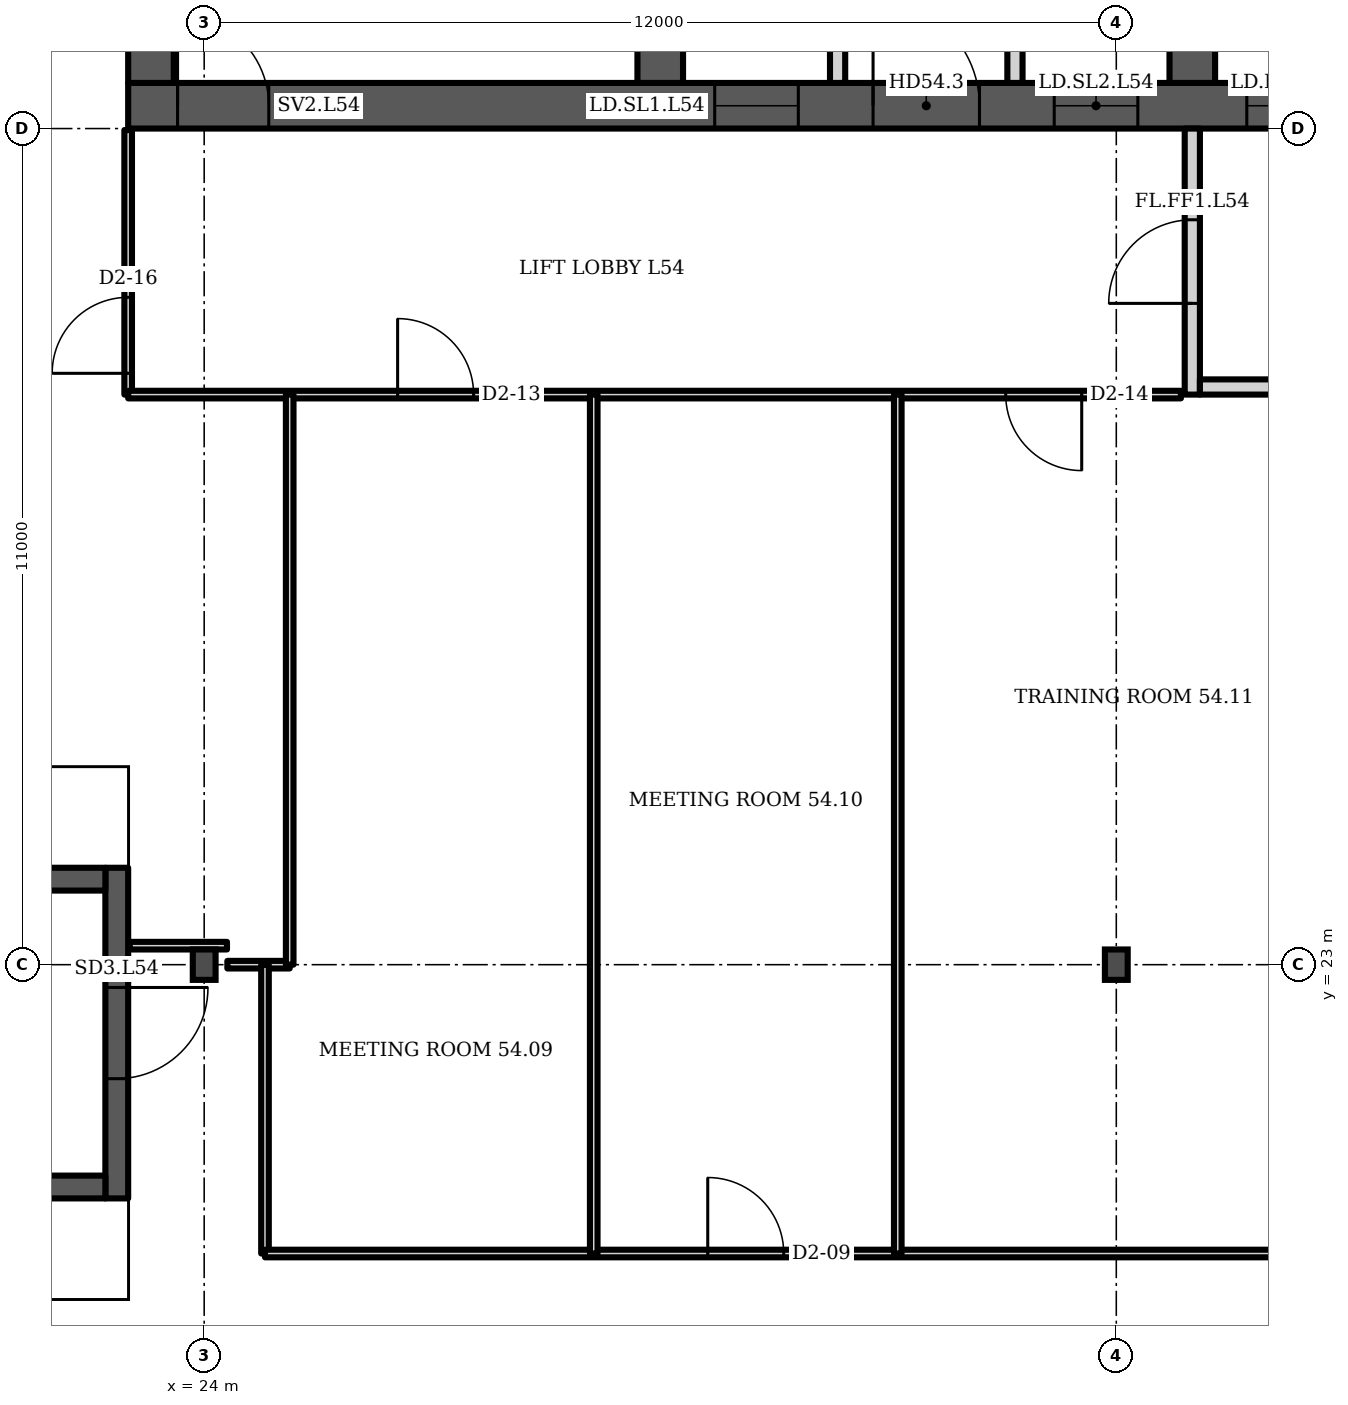
"""IFC4 building model, lengths in metres.
Left out: names, types, materials, properties, quantities, classifications, styles, units other than length and angle.
Written with IfcOpenShell. Run it as: python <this file> out.ifc"""

import sys

from ifc_helpers import new_model, si_unit, direction, frame, frame_2d, origin, origin_2d, place, context, subcontext, project, spatial, polyline, rectangle, i_section, outline, extrude, element, fill, save


model = new_model("IFC4")
c1 = context("Model", 3, precision=1e-05, world=origin(), true_north=direction((0.0, 1.0)))
c2 = subcontext(c1, "Body", "Model", "MODEL_VIEW")
j1 = project(units=[si_unit("LENGTHUNIT", "METRE"), si_unit("PLANEANGLEUNIT", "RADIAN")], contexts=[c1])
p1 = place(None, origin())
s1 = spatial("IfcSite", under=j1, at=p1, CompositionType="ELEMENT")
p2 = place(p1, origin())
s2 = spatial("IfcBuilding", under=s1, at=p2, CompositionType="ELEMENT")
p3 = place(p2, frame((0.0, 0.0, 217.9)))
s3 = spatial("IfcBuildingStorey", under=s2, at=p3, CompositionType="ELEMENT", Elevation=217.9)
p4 = place(p3, frame((23.0, 34.3, 0.0), z_axis=(0.0, 0.0, 1.0), x_axis=(1.0, 0.0, 0.0)))
e1 = element("IfcWall", 1, at=p4, inside=s3, PredefinedType="SHEAR", context=c2, shape_type="SweptSolid", body=[
    extrude(rectangle(XDim=35.0, YDim=0.6, at=frame_2d((17.5, 0.0))), origin(), (0.0, 0.0, 1.0), 3.6),
])
p5 = place(p4, frame((0.65, 0.0, 0.0)))
e2 = element("IfcOpeningElement", 2, at=p5, cuts=e1, PredefinedType="OPENING", context=c2, shape_type="SweptSolid", body=[
    extrude(rectangle(XDim=1.2, YDim=2.1, at=frame_2d((0.6, 1.05))), frame((0.0, 0.31, 0.0), z_axis=(0.0, -1.0, 0.0), x_axis=(1.0, 0.0, 0.0)), (0.0, 0.0, 1.0), 0.62),
])
p6 = place(p4, frame((7.717, 0.0, 0.0)))
e3 = element("IfcOpeningElement", 3, at=p6, cuts=e1, PredefinedType="OPENING", context=c2, shape_type="SweptSolid", body=[
    extrude(rectangle(XDim=1.1, YDim=2.1, at=frame_2d((0.55, 1.05))), frame((0.0, 0.31, 0.0), z_axis=(0.0, -1.0, 0.0), x_axis=(1.0, 0.0, 0.0)), (0.0, 0.0, 1.0), 0.62),
])
p7 = place(p4, frame((12.183, 0.0, 0.0)))
e4 = element("IfcOpeningElement", 4, at=p7, cuts=e1, PredefinedType="OPENING", context=c2, shape_type="SweptSolid", body=[
    extrude(rectangle(XDim=1.1, YDim=2.1, at=frame_2d((0.55, 1.05))), frame((0.0, 0.31, 0.0), z_axis=(0.0, -1.0, 0.0), x_axis=(1.0, 0.0, 0.0)), (0.0, 0.0, 1.0), 0.62),
])
p8 = place(p4, frame((9.8, 0.0, 0.0)))
e5 = element("IfcOpeningElement", 5, at=p8, cuts=e1, PredefinedType="OPENING", context=c2, shape_type="SweptSolid", body=[
    extrude(rectangle(XDim=1.4, YDim=2.1, at=frame_2d((0.7, 1.05))), frame((0.0, 0.31, 0.0), z_axis=(0.0, -1.0, 0.0), x_axis=(1.0, 0.0, 0.0)), (0.0, 0.0, 1.0), 0.62),
])
p9 = place(p4, frame((14.717, 0.0, 0.0)))
e6 = element("IfcOpeningElement", 6, at=p9, cuts=e1, PredefinedType="OPENING", context=c2, shape_type="SweptSolid", body=[
    extrude(rectangle(XDim=1.1, YDim=2.1, at=frame_2d((0.55, 1.05))), frame((0.0, 0.31, 0.0), z_axis=(0.0, -1.0, 0.0), x_axis=(1.0, 0.0, 0.0)), (0.0, 0.0, 1.0), 0.62),
])
p10 = place(p4, frame((16.95, 0.0, 0.0)))
e7 = element("IfcOpeningElement", 7, at=p10, cuts=e1, PredefinedType="OPENING", context=c2, shape_type="SweptSolid", body=[
    extrude(rectangle(XDim=1.1, YDim=2.1, at=frame_2d((0.55, 1.05))), frame((0.0, 0.31, 0.0), z_axis=(0.0, -1.0, 0.0), x_axis=(1.0, 0.0, 0.0)), (0.0, 0.0, 1.0), 0.62),
])
p11 = place(p4, frame((19.183, 0.0, 0.0)))
e8 = element("IfcOpeningElement", 8, at=p11, cuts=e1, PredefinedType="OPENING", context=c2, shape_type="SweptSolid", body=[
    extrude(rectangle(XDim=1.1, YDim=2.1, at=frame_2d((0.55, 1.05))), frame((0.0, 0.31, 0.0), z_axis=(0.0, -1.0, 0.0), x_axis=(1.0, 0.0, 0.0)), (0.0, 0.0, 1.0), 0.62),
])
p12 = place(p4, frame((26.15, 0.0, 0.0)))
e9 = element("IfcOpeningElement", 9, at=p12, cuts=e1, PredefinedType="OPENING", context=c2, shape_type="SweptSolid", body=[
    extrude(rectangle(XDim=1.2, YDim=2.1, at=frame_2d((0.6, 1.05))), frame((0.0, 0.31, 0.0), z_axis=(0.0, -1.0, 0.0), x_axis=(1.0, 0.0, 0.0)), (0.0, 0.0, 1.0), 0.62),
])
p13 = place(p4, frame((28.767, 0.0, 0.0)))
e10 = element("IfcOpeningElement", 10, at=p13, cuts=e1, PredefinedType="OPENING", context=c2, shape_type="SweptSolid", body=[
    extrude(rectangle(XDim=1.0, YDim=2.1, at=frame_2d((0.5, 1.05))), frame((0.0, 0.31, 0.0), z_axis=(0.0, -1.0, 0.0), x_axis=(1.0, 0.0, 0.0)), (0.0, 0.0, 1.0), 0.62),
])
p14 = place(p4, frame((33.083, 0.0, 0.0)))
e11 = element("IfcOpeningElement", 11, at=p14, cuts=e1, PredefinedType="OPENING", context=c2, shape_type="SweptSolid", body=[
    extrude(rectangle(XDim=1.0, YDim=2.1, at=frame_2d((0.5, 1.05))), frame((0.0, 0.31, 0.0), z_axis=(0.0, -1.0, 0.0), x_axis=(1.0, 0.0, 0.0)), (0.0, 0.0, 1.0), 0.62),
])
p15 = place(p4, frame((30.8, 0.0, 0.0)))
e12 = element("IfcOpeningElement", 12, at=p15, cuts=e1, PredefinedType="OPENING", context=c2, shape_type="SweptSolid", body=[
    extrude(rectangle(XDim=1.4, YDim=2.1, at=frame_2d((0.7, 1.05))), frame((0.0, 0.31, 0.0), z_axis=(0.0, -1.0, 0.0), x_axis=(1.0, 0.0, 0.0)), (0.0, 0.0, 1.0), 0.62),
])
p16 = place(p3, frame((23.3, 34.6, 0.0), z_axis=(0.0, 0.0, 1.0), x_axis=(0.0, 1.0, 0.0)))
e13 = element("IfcWall", 13, at=p16, inside=s3, PredefinedType="SHEAR", context=c2, shape_type="SweptSolid", body=[
    extrude(rectangle(XDim=13.585, YDim=0.6, at=frame_2d((6.792, 0.0))), origin(), (0.0, 0.0, 1.0), 3.6),
])
p17 = place(p3, frame((30.0, 34.6, 0.0), z_axis=(0.0, 0.0, 1.0), x_axis=(0.0, 1.0, 0.0)))
e14 = element("IfcWall", 14, at=p17, inside=s3, PredefinedType="SHEAR", context=c2, shape_type="SweptSolid", body=[
    extrude(rectangle(XDim=14.171, YDim=0.6, at=frame_2d((7.085, 0.0))), origin(), (0.0, 0.0, 1.0), 3.6),
])
p18 = place(p17, frame((3.8, 0.0, 0.0)))
e15 = element("IfcOpeningElement", 15, at=p18, cuts=e14, PredefinedType="OPENING", context=c2, shape_type="SweptSolid", body=[
    extrude(rectangle(XDim=1.1, YDim=2.1, at=frame_2d((0.55, 1.05))), frame((0.0, 0.31, 0.0), z_axis=(0.0, -1.0, 0.0), x_axis=(1.0, 0.0, 0.0)), (0.0, 0.0, 1.0), 0.62),
])
p19 = place(p3, frame((37.0, 34.6, 0.0), z_axis=(0.0, 0.0, 1.0), x_axis=(0.0, 1.0, 0.0)))
e16 = element("IfcWall", 16, at=p19, inside=s3, PredefinedType="SHEAR", context=c2, shape_type="SweptSolid", body=[
    extrude(rectangle(XDim=14.784, YDim=0.6, at=frame_2d((7.392, 0.0))), origin(), (0.0, 0.0, 1.0), 3.6),
])
p20 = place(p19, frame((11.302, 0.0, 0.0)))
e17 = element("IfcOpeningElement", 17, at=p20, cuts=e16, PredefinedType="OPENING", context=c2, shape_type="SweptSolid", body=[
    extrude(rectangle(XDim=1.0, YDim=2.1, at=frame_2d((0.5, 1.05))), frame((0.0, 0.31, 0.0), z_axis=(0.0, -1.0, 0.0), x_axis=(1.0, 0.0, 0.0)), (0.0, 0.0, 1.0), 0.62),
])
p21 = place(p19, frame((3.8, 0.0, 0.0)))
e18 = element("IfcOpeningElement", 18, at=p21, cuts=e16, PredefinedType="OPENING", context=c2, shape_type="SweptSolid", body=[
    extrude(rectangle(XDim=1.1, YDim=2.1, at=frame_2d((0.55, 1.05))), frame((0.0, 0.31, 0.0), z_axis=(0.0, -1.0, 0.0), x_axis=(1.0, 0.0, 0.0)), (0.0, 0.0, 1.0), 0.62),
])
for number, where, z_axis, x_axis in (
    (19, (24.0, 23.0, 0.0), (0.0, 0.0, 1.0), (1.0, 0.0, 0.0)),
    (20, (36.0, 23.0, 0.0), (0.0, 0.0, 1.0), (1.0, 0.0, 0.0)),
):
    element("IfcColumn", number, at=place(p3, frame(where, z_axis=z_axis, x_axis=x_axis)), inside=s3, PredefinedType="COLUMN", context=c2, shape_type="SweptSolid", body=[
        extrude(i_section(OverallWidth=0.3, OverallDepth=0.4, WebThickness=0.013, FlangeThickness=0.024, FilletRadius=0.027, at=origin_2d()), origin(), (0.0, 0.0, 1.0), 3.6),
    ])
p22 = place(p3, origin())
e21 = element("IfcWall", 21, at=p22, inside=s3, PredefinedType="PARTITIONING", context=c2, shape_type="SweptSolid", body=[
    extrude(outline(polyline([(32.233, 37.45), (30.3, 37.45), (30.3, 37.65), (32.233, 37.65), (32.433, 37.65), (32.433, 34.6), (32.233, 34.6), (32.233, 37.45)])), origin(), (0.0, 0.0, 1.0), 3.2),
])
p23 = place(p3, origin())
e22 = element("IfcWall", 22, at=p23, inside=s3, PredefinedType="PARTITIONING", context=c2, shape_type="SweptSolid", body=[
    extrude(outline(polyline([(34.567, 37.65), (34.767, 37.65), (36.7, 37.65), (36.7, 37.45), (34.767, 37.45), (34.767, 34.6), (34.567, 34.6), (34.567, 37.65)])), origin(), (0.0, 0.0, 1.0), 3.2),
])
p24 = place(p3, origin())
e23 = element("IfcWall", 23, at=p24, inside=s3, PredefinedType="PARTITIONING", context=c2, shape_type="SweptSolid", body=[
    extrude(outline(polyline([(41.567, 37.1), (39.433, 37.1), (39.433, 34.6), (39.233, 34.6), (39.233, 37.45), (37.3, 37.45), (37.3, 37.65), (39.233, 37.65), (39.433, 37.65), (39.433, 37.3), (41.567, 37.3), (41.567, 37.35), (41.767, 37.35), (43.7, 37.35), (43.7, 37.15), (41.767, 37.15), (41.767, 34.6), (41.567, 34.6), (41.567, 37.1)])), origin(), (0.0, 0.0, 1.0), 3.2),
])
p25 = place(p3, frame((37.0, 30.5, 0.0), z_axis=(0.0, 0.0, 1.0), x_axis=(0.0, 1.0, 0.0)))
e24 = element("IfcWall", 24, at=p25, inside=s3, PredefinedType="PARTITIONING", context=c2, shape_type="SweptSolid", body=[
    extrude(rectangle(XDim=3.5, YDim=0.2, at=frame_2d((1.75, 0.0))), origin(), (0.0, 0.0, 1.0), 3.2),
])
p26 = place(p25, frame((1.2, 0.0, 0.0)))
e25 = element("IfcOpeningElement", 25, at=p26, cuts=e24, PredefinedType="OPENING", context=c2, shape_type="SweptSolid", body=[
    extrude(rectangle(XDim=1.1, YDim=2.1, at=frame_2d((0.55, 1.05))), frame((0.0, 0.11, 0.0), z_axis=(0.0, -1.0, 0.0), x_axis=(1.0, 0.0, 0.0)), (0.0, 0.0, 1.0), 0.22),
])
p27 = place(p3, frame((37.1, 30.6, 0.0), z_axis=(0.0, 0.0, 1.0), x_axis=(1.0, 0.0, 0.0)))
e26 = element("IfcWall", 26, at=p27, inside=s3, PredefinedType="PARTITIONING", context=c2, shape_type="SweptSolid", body=[
    extrude(rectangle(XDim=2.8, YDim=0.2, at=frame_2d((1.4, 0.0))), origin(), (0.0, 0.0, 1.0), 3.2),
])
p28 = place(p3, frame((22.85, 19.925, 0.0), z_axis=(0.0, 0.0, 1.0), x_axis=(0.0, 1.0, 0.0)))
e27 = element("IfcWall", 27, at=p28, inside=s3, PredefinedType="SHEAR", context=c2, shape_type="SweptSolid", body=[
    extrude(rectangle(XDim=4.35, YDim=0.3, at=frame_2d((2.175, 0.0))), origin(), (0.0, 0.0, 1.0), 3.2),
])
p29 = place(p28, frame((1.575, 0.0, 0.0)))
e28 = element("IfcOpeningElement", 28, at=p29, cuts=e27, PredefinedType="OPENING", context=c2, shape_type="SweptSolid", body=[
    extrude(rectangle(XDim=1.2, YDim=2.1, at=frame_2d((0.6, 1.05))), frame((0.0, 0.16, 0.0), z_axis=(0.0, -1.0, 0.0), x_axis=(1.0, 0.0, 0.0)), (0.0, 0.0, 1.0), 0.32),
])
p30 = place(p3, frame((23.0, 30.5, 0.0), z_axis=(0.0, 0.0, 1.0), x_axis=(0.0, 1.0, 0.0)))
e29 = element("IfcWall", 29, at=p30, inside=s3, PredefinedType="PARTITIONING", context=c2, shape_type="SweptSolid", body=[
    extrude(rectangle(XDim=3.48, YDim=0.1, at=frame_2d((1.74, 0.0))), origin(), (0.0, 0.0, 1.0), 3.2),
])
p31 = place(p30, frame((0.28, 0.0, 0.0)))
e30 = element("IfcOpeningElement", 30, at=p31, cuts=e29, PredefinedType="OPENING", context=c2, shape_type="SweptSolid", body=[
    extrude(rectangle(XDim=1.0, YDim=2.1, at=frame_2d((0.5, 1.05))), frame((0.0, 0.06, 0.0), z_axis=(0.0, -1.0, 0.0), x_axis=(1.0, 0.0, 0.0)), (0.0, 0.0, 1.0), 0.12),
])
p32 = place(p3, frame((23.0, 30.5, 0.0), z_axis=(0.0, 0.0, 1.0), x_axis=(1.0, 0.0, 0.0)))
e31 = element("IfcWall", 31, at=p32, inside=s3, PredefinedType="PARTITIONING", context=c2, shape_type="SweptSolid", body=[
    extrude(rectangle(XDim=13.85, YDim=0.1, at=frame_2d((6.925, 0.0))), origin(), (0.0, 0.0, 1.0), 3.2),
])
p33 = place(p32, frame((3.545, 0.0, 0.0)))
e32 = element("IfcOpeningElement", 32, at=p33, cuts=e31, PredefinedType="OPENING", context=c2, shape_type="SweptSolid", body=[
    extrude(rectangle(XDim=1.0, YDim=2.1, at=frame_2d((0.5, 1.05))), frame((0.0, 0.06, 0.0), z_axis=(0.0, -1.0, 0.0), x_axis=(1.0, 0.0, 0.0)), (0.0, 0.0, 1.0), 0.12),
])
p34 = place(p32, frame((11.545, 0.0, 0.0)))
e33 = element("IfcOpeningElement", 33, at=p34, cuts=e31, PredefinedType="OPENING", context=c2, shape_type="SweptSolid", body=[
    extrude(rectangle(XDim=1.0, YDim=2.1, at=frame_2d((0.5, 1.05))), frame((0.0, 0.06, 0.0), z_axis=(0.0, -1.0, 0.0), x_axis=(1.0, 0.0, 0.0)), (0.0, 0.0, 1.0), 0.12),
])
p35 = place(p3, frame((23.02, 23.25, 0.0), z_axis=(0.0, 0.0, 1.0), x_axis=(1.0, 0.0, 0.0)))
e34 = element("IfcWall", 34, at=p35, inside=s3, PredefinedType="PARTITIONING", context=c2, shape_type="SweptSolid", body=[
    extrude(rectangle(XDim=1.28, YDim=0.1, at=frame_2d((0.64, 0.0))), origin(), (0.0, 0.0, 1.0), 3.2),
])
p36 = place(p3, frame((24.305, 23.0, 0.0), z_axis=(0.0, 0.0, 1.0), x_axis=(1.0, 0.0, 0.0)))
e35 = element("IfcWall", 35, at=p36, inside=s3, PredefinedType="PARTITIONING", context=c2, shape_type="SweptSolid", body=[
    extrude(rectangle(XDim=0.82, YDim=0.1, at=frame_2d((0.41, 0.0))), origin(), (0.0, 0.0, 1.0), 3.2),
])
p37 = place(p3, frame((24.8, 19.2, 0.0), z_axis=(0.0, 0.0, 1.0), x_axis=(0.0, 1.0, 0.0)))
e36 = element("IfcWall", 36, at=p37, inside=s3, PredefinedType="PARTITIONING", context=c2, shape_type="SweptSolid", body=[
    extrude(rectangle(XDim=3.8, YDim=0.1, at=frame_2d((1.9, 0.0))), origin(), (0.0, 0.0, 1.0), 3.2),
])
p38 = place(p3, frame((24.8, 19.2, 0.0), z_axis=(0.0, 0.0, 1.0), x_axis=(1.0, 0.0, 0.0)))
e37 = element("IfcWall", 37, at=p38, inside=s3, PredefinedType="PARTITIONING", context=c2, shape_type="SweptSolid", body=[
    extrude(rectangle(XDim=20.76, YDim=0.1, at=frame_2d((10.38, 0.0))), origin(), (0.0, 0.0, 1.0), 3.2),
])
p39 = place(p38, frame((5.825, 0.0, 0.0)))
e38 = element("IfcOpeningElement", 38, at=p39, cuts=e37, PredefinedType="OPENING", context=c2, shape_type="SweptSolid", body=[
    extrude(rectangle(XDim=1.0, YDim=2.1, at=frame_2d((0.5, 1.05))), frame((0.0, 0.06, 0.0), z_axis=(0.0, -1.0, 0.0), x_axis=(1.0, 0.0, 0.0)), (0.0, 0.0, 1.0), 0.12),
])
p40 = place(p3, frame((25.125, 23.0, 0.0), z_axis=(0.0, 0.0, 1.0), x_axis=(0.0, 1.0, 0.0)))
e39 = element("IfcWall", 39, at=p40, inside=s3, PredefinedType="PARTITIONING", context=c2, shape_type="SweptSolid", body=[
    extrude(rectangle(XDim=7.5, YDim=0.1, at=frame_2d((3.75, 0.0))), origin(), (0.0, 0.0, 1.0), 3.2),
])
for number, where, z_axis, x_axis in (
    (40, (29.125, 19.2, 0.0), (0.0, 0.0, 1.0), (0.0, 1.0, 0.0)),
    (41, (33.125, 19.2, 0.0), (0.0, 0.0, 1.0), (0.0, 1.0, 0.0)),
):
    element("IfcWall", number, at=place(p3, frame(where, z_axis=z_axis, x_axis=x_axis)), inside=s3, PredefinedType="PARTITIONING", context=c2, shape_type="SweptSolid", body=[
        extrude(rectangle(XDim=11.3, YDim=0.1, at=frame_2d((5.65, 0.0))), origin(), (0.0, 0.0, 1.0), 3.2),
    ])
for number, where, z_axis, x_axis in (
    (42, (15.2, 20.075, 0.0), (0.0, 0.0, 1.0), (1.0, 0.0, 0.0)),
    (43, (15.2, 24.125, 0.0), (0.0, 0.0, 1.0), (1.0, 0.0, 0.0)),
):
    element("IfcWall", number, at=place(p3, frame(where, z_axis=z_axis, x_axis=x_axis)), inside=s3, PredefinedType="SHEAR", context=c2, shape_type="SweptSolid", body=[
        extrude(rectangle(XDim=7.5, YDim=0.3, at=frame_2d((3.75, 0.0))), origin(), (0.0, 0.0, 1.0), 3.2),
    ])
p41 = place(p5, origin())
e44 = element("IfcDoor", 44, at=p41, inside=s3, OperationType="SINGLE_SWING_LEFT", PredefinedType="DOOR", context=c2, shape_type="SweptSolid", body=[
    extrude(rectangle(XDim=1.2, YDim=2.1, at=frame_2d((0.6, 1.05))), frame((0.0, 0.025, 0.0), z_axis=(0.0, -1.0, 0.0), x_axis=(1.0, 0.0, 0.0)), (0.0, 0.0, 1.0), 0.05),
])
fill(e2, e44)
p42 = place(p6, origin())
e45 = element("IfcDoor", 45, at=p42, inside=s3, OperationType="DOUBLE_DOOR_SLIDING", PredefinedType="DOOR", context=c2, shape_type="SweptSolid", body=[
    extrude(rectangle(XDim=1.1, YDim=2.1, at=frame_2d((0.55, 1.05))), frame((0.0, 0.025, 0.0), z_axis=(0.0, -1.0, 0.0), x_axis=(1.0, 0.0, 0.0)), (0.0, 0.0, 1.0), 0.05),
])
fill(e3, e45)
p43 = place(p7, origin())
e46 = element("IfcDoor", 46, at=p43, inside=s3, OperationType="DOUBLE_DOOR_SLIDING", PredefinedType="DOOR", context=c2, shape_type="SweptSolid", body=[
    extrude(rectangle(XDim=1.1, YDim=2.1, at=frame_2d((0.55, 1.05))), frame((0.0, 0.025, 0.0), z_axis=(0.0, -1.0, 0.0), x_axis=(1.0, 0.0, 0.0)), (0.0, 0.0, 1.0), 0.05),
])
fill(e4, e46)
p44 = place(p8, origin())
e47 = element("IfcDoor", 47, at=p44, inside=s3, OperationType="DOUBLE_DOOR_SINGLE_SWING", PredefinedType="DOOR", context=c2, shape_type="SweptSolid", body=[
    extrude(rectangle(XDim=1.4, YDim=2.1, at=frame_2d((0.7, 1.05))), frame((0.0, 0.025, 0.0), z_axis=(0.0, -1.0, 0.0), x_axis=(1.0, 0.0, 0.0)), (0.0, 0.0, 1.0), 0.05),
])
fill(e5, e47)
p45 = place(p9, origin())
e48 = element("IfcDoor", 48, at=p45, inside=s3, OperationType="DOUBLE_DOOR_SLIDING", PredefinedType="DOOR", context=c2, shape_type="SweptSolid", body=[
    extrude(rectangle(XDim=1.1, YDim=2.1, at=frame_2d((0.55, 1.05))), frame((0.0, 0.025, 0.0), z_axis=(0.0, -1.0, 0.0), x_axis=(1.0, 0.0, 0.0)), (0.0, 0.0, 1.0), 0.05),
])
fill(e6, e48)
p46 = place(p26, origin())
e49 = element("IfcDoor", 49, at=p46, inside=s3, OperationType="SINGLE_SWING_LEFT", PredefinedType="DOOR", context=c2, shape_type="SweptSolid", body=[
    extrude(rectangle(XDim=1.1, YDim=2.1, at=frame_2d((0.55, 1.05))), frame((0.0, 0.025, 0.0), z_axis=(0.0, -1.0, 0.0), x_axis=(1.0, 0.0, 0.0)), (0.0, 0.0, 1.0), 0.05),
])
fill(e25, e49)
p47 = place(p29, origin())
e50 = element("IfcDoor", 50, at=p47, inside=s3, OperationType="SINGLE_SWING_RIGHT", PredefinedType="DOOR", context=c2, shape_type="SweptSolid", body=[
    extrude(rectangle(XDim=1.2, YDim=2.1, at=frame_2d((0.6, 1.05))), frame((0.0, 0.025, 0.0), z_axis=(0.0, -1.0, 0.0), x_axis=(1.0, 0.0, 0.0)), (0.0, 0.0, 1.0), 0.05),
])
fill(e28, e50)
p48 = place(p39, origin())
e51 = element("IfcDoor", 51, at=p48, inside=s3, OperationType="SINGLE_SWING_LEFT", PredefinedType="DOOR", context=c2, shape_type="SweptSolid", body=[
    extrude(rectangle(XDim=1.0, YDim=2.1, at=frame_2d((0.5, 1.05))), frame((0.0, 0.025, 0.0), z_axis=(0.0, -1.0, 0.0), x_axis=(1.0, 0.0, 0.0)), (0.0, 0.0, 1.0), 0.05),
])
fill(e38, e51)
p49 = place(p33, origin())
e52 = element("IfcDoor", 52, at=p49, inside=s3, OperationType="SINGLE_SWING_LEFT", PredefinedType="DOOR", context=c2, shape_type="SweptSolid", body=[
    extrude(rectangle(XDim=1.0, YDim=2.1, at=frame_2d((0.5, 1.05))), frame((0.0, 0.025, 0.0), z_axis=(0.0, -1.0, 0.0), x_axis=(1.0, 0.0, 0.0)), (0.0, 0.0, 1.0), 0.05),
])
fill(e32, e52)
p50 = place(p34, origin())
e53 = element("IfcDoor", 53, at=p50, inside=s3, OperationType="SINGLE_SWING_RIGHT", PredefinedType="DOOR", context=c2, shape_type="SweptSolid", body=[
    extrude(rectangle(XDim=1.0, YDim=2.1, at=frame_2d((0.5, 1.05))), frame((0.0, 0.025, 0.0), z_axis=(0.0, -1.0, 0.0), x_axis=(1.0, 0.0, 0.0)), (0.0, 0.0, 1.0), 0.05),
])
fill(e33, e53)
p51 = place(p31, origin())
e54 = element("IfcDoor", 54, at=p51, inside=s3, OperationType="SINGLE_SWING_LEFT", PredefinedType="DOOR", context=c2, shape_type="SweptSolid", body=[
    extrude(rectangle(XDim=1.0, YDim=2.1, at=frame_2d((0.5, 1.05))), frame((0.0, 0.025, 0.0), z_axis=(0.0, -1.0, 0.0), x_axis=(1.0, 0.0, 0.0)), (0.0, 0.0, 1.0), 0.05),
])
fill(e30, e54)
save(model, sys.argv[1])
